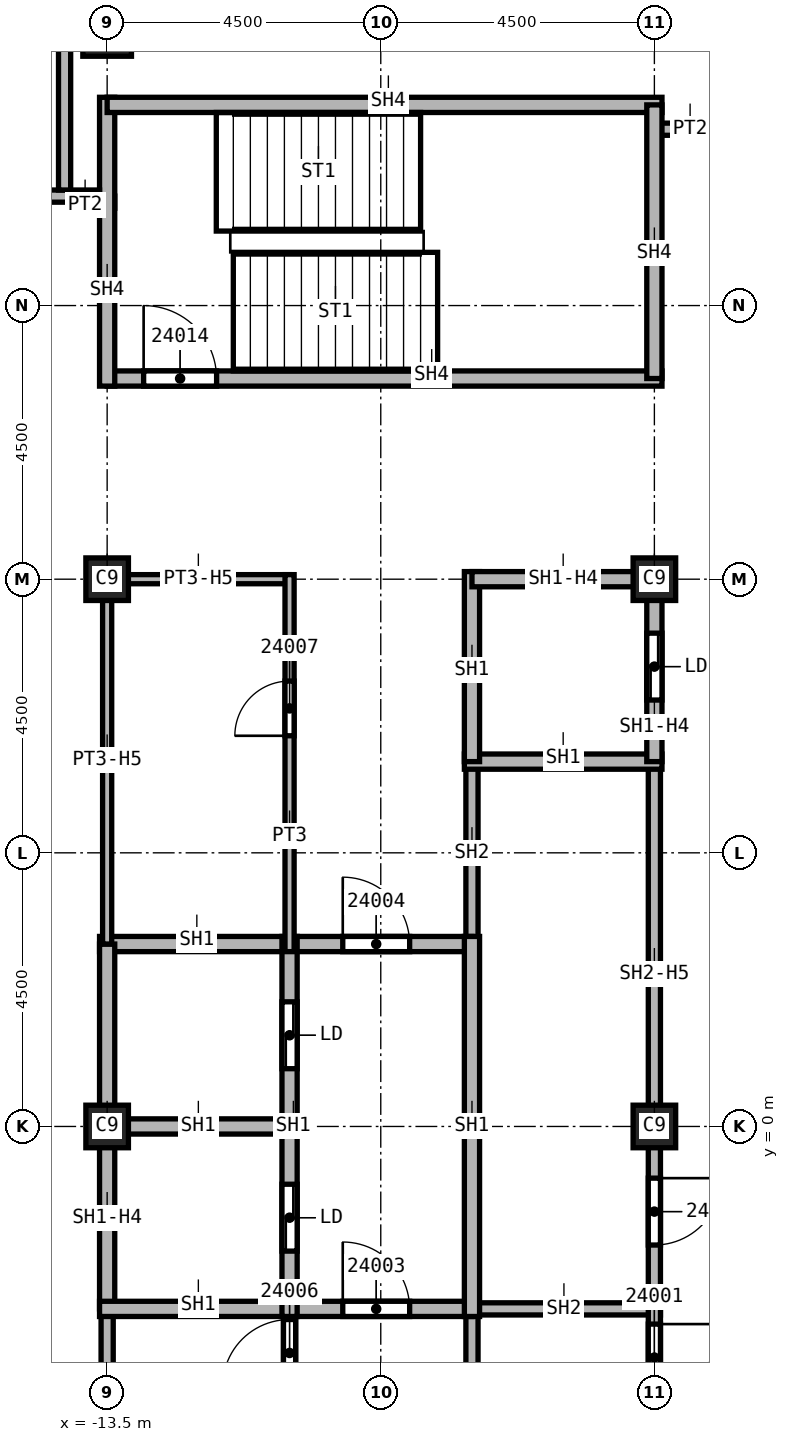
"""IFC4 building model, lengths in metres.
Left out: names, types, materials, properties, quantities, classifications, styles, units other than length and angle.
Written with IfcOpenShell. Run it as: python <this file> out.ifc"""

import sys

from ifc_helpers import new_model, si_unit, direction, frame, frame_2d, origin, origin_2d, place, context, subcontext, project, spatial, rectangle, extrude, element, fill, save


model = new_model("IFC4")
c1 = context("Model", 3, precision=1e-05, world=origin(), true_north=direction((0.0, 1.0)))
c2 = subcontext(c1, "Body", "Model", "MODEL_VIEW")
j1 = project(units=[si_unit("LENGTHUNIT", "METRE"), si_unit("PLANEANGLEUNIT", "RADIAN")], contexts=[c1])
p1 = place(None, origin())
s1 = spatial("IfcSite", under=j1, at=p1, CompositionType="ELEMENT")
p2 = place(p1, origin())
s2 = spatial("IfcBuilding", under=s1, at=p2, CompositionType="ELEMENT")
p3 = place(p2, frame((0.0, 0.0, 346.0)))
s3 = spatial("IfcBuildingStorey", under=s2, at=p3, CompositionType="ELEMENT", Elevation=346.0)
p4 = place(p3, frame((-13.5, 18.0, 0.0), z_axis=(0.0, 0.0, 1.0), x_axis=(1.0, 0.0, 0.0)))
e1 = element("IfcColumn", 1, at=p4, inside=s3, PredefinedType="COLUMN", context=c2, shape_type="SweptSolid", body=[
    extrude(rectangle(XDim=0.8, YDim=0.8, at=origin_2d()), origin(), (0.0, 0.0, 1.0), 3.59),
])
for number, where, z_axis, x_axis in (
    (2, (-4.5, 0.0, 0.0), (0.0, 0.0, 1.0), (1.0, 0.0, 0.0)),
    (3, (-4.5, 9.0, 0.0), (0.0, 0.0, 1.0), (1.0, 0.0, 0.0)),
    (4, (-13.5, 0.0, 0.0), (0.0, 0.0, 1.0), (1.0, 0.0, 0.0)),
    (5, (-13.5, 9.0, 0.0), (0.0, 0.0, 1.0), (1.0, 0.0, 0.0)),
):
    element("IfcColumn", number, at=place(p3, frame(where, z_axis=z_axis, x_axis=x_axis)), inside=s3, PredefinedType="COLUMN", context=c2, shape_type="SweptSolid", body=[
        extrude(rectangle(XDim=0.7, YDim=0.7, at=origin_2d()), origin(), (0.0, 0.0, 1.0), 3.59),
    ])
p5 = place(p3, frame((-14.1, 15.2, 0.0), z_axis=(0.0, 0.0, 1.0), x_axis=(1.0, 0.0, 0.0)))
e6 = element("IfcWall", 6, at=p5, inside=s3, PredefinedType="PARTITIONING", context=c2, shape_type="SweptSolid", body=[
    extrude(rectangle(XDim=0.725, YDim=0.2, at=frame_2d((0.363, 0.0))), origin(), (0.0, 0.0, 1.0), 3.59),
])
p6 = place(p3, frame((-4.5, 16.4, 0.0), z_axis=(0.0, 0.0, 1.0), x_axis=(1.0, 0.0, 0.0)))
e7 = element("IfcWall", 7, at=p6, inside=s3, PredefinedType="PARTITIONING", context=c2, shape_type="SweptSolid", body=[
    extrude(rectangle(XDim=1.05, YDim=0.2, at=frame_2d((0.525, 0.0))), origin(), (0.0, 0.0, 1.0), 3.59),
])
p7 = place(p3, frame((-13.5, -7.0, 0.0), z_axis=(0.0, 0.0, 1.0), x_axis=(0.0, 1.0, 0.0)))
e8 = element("IfcWall", 8, at=p7, inside=s3, PredefinedType="SOLIDWALL", context=c2, shape_type="SweptSolid", body=[
    extrude(rectangle(XDim=4.0, YDim=0.2, at=frame_2d((2.0, 0.0))), origin(), (0.0, 0.0, 1.0), 2.828),
])
p8 = place(p3, frame((-10.5, -7.075, 0.0), z_axis=(0.0, 0.0, 1.0), x_axis=(0.0, 1.0, 0.0)))
e9 = element("IfcWall", 9, at=p8, inside=s3, PredefinedType="SOLIDWALL", context=c2, shape_type="SweptSolid", body=[
    extrude(rectangle(XDim=4.2, YDim=0.2, at=frame_2d((2.1, 0.0))), origin(), (0.0, 0.0, 1.0), 3.59),
])
p9 = place(p8, frame((2.8, 0.0, 0.0)))
e10 = element("IfcOpeningElement", 10, at=p9, cuts=e9, PredefinedType="OPENING", context=c2, shape_type="SweptSolid", body=[
    extrude(rectangle(XDim=1.1, YDim=2.1, at=frame_2d((0.55, 1.05))), frame((0.0, 0.1, 0.0), z_axis=(0.0, -1.0, 0.0), x_axis=(1.0, 0.0, 0.0)), (0.0, 0.0, 1.0), 0.2),
])
p10 = place(p3, frame((-7.625, -3.0, 0.0), z_axis=(0.0, 0.0, 1.0), x_axis=(1.0, 0.0, 0.0)))
e11 = element("IfcWall", 11, at=p10, inside=s3, PredefinedType="SOLIDWALL", context=c2, shape_type="SweptSolid", body=[
    extrude(rectangle(XDim=3.225, YDim=0.2, at=frame_2d((1.613, 0.0))), origin(), (0.0, 0.0, 1.0), 3.59),
])
p11 = place(p3, frame((-7.5, -9.1, 0.0), z_axis=(0.0, 0.0, 1.0), x_axis=(0.0, 1.0, 0.0)))
e12 = element("IfcWall", 12, at=p11, inside=s3, PredefinedType="SOLIDWALL", context=c2, shape_type="SweptSolid", body=[
    extrude(rectangle(XDim=6.225, YDim=0.2, at=frame_2d((3.113, 0.0))), origin(), (0.0, 0.0, 1.0), 3.59),
])
p12 = place(p3, frame((-7.5, 2.875, 0.0), z_axis=(0.0, 0.0, 1.0), x_axis=(0.0, 1.0, 0.0)))
e13 = element("IfcWall", 13, at=p12, inside=s3, PredefinedType="SOLIDWALL", context=c2, shape_type="SweptSolid", body=[
    extrude(rectangle(XDim=3.125, YDim=0.2, at=frame_2d((1.562, 0.0))), origin(), (0.0, 0.0, 1.0), 3.59),
])
p13 = place(p3, frame((-4.5, 6.0, 0.0), z_axis=(0.0, 0.0, 1.0), x_axis=(0.0, -1.0, 0.0)))
e14 = element("IfcWall", 14, at=p13, inside=s3, PredefinedType="SOLIDWALL", context=c2, shape_type="SweptSolid", body=[
    extrude(rectangle(XDim=15.1, YDim=0.2, at=frame_2d((7.55, 0.0))), origin(), (0.0, 0.0, 1.0), 2.828),
])
p14 = place(p13, frame((9.25, 0.0, 0.0)))
e15 = element("IfcOpeningElement", 15, at=p14, cuts=e14, PredefinedType="OPENING", context=c2, shape_type="SweptSolid", body=[
    extrude(rectangle(XDim=1.1, YDim=2.1, at=frame_2d((0.55, 1.05))), frame((0.0, 0.1, 0.0), z_axis=(0.0, -1.0, 0.0), x_axis=(1.0, 0.0, 0.0)), (0.0, 0.0, 1.0), 0.2),
])
p15 = place(p13, frame((6.85, 0.0, 0.0)))
e16 = element("IfcOpeningElement", 16, at=p15, cuts=e14, PredefinedType="OPENING", context=c2, shape_type="SweptSolid", body=[
    extrude(rectangle(XDim=1.1, YDim=2.1, at=frame_2d((0.55, 1.05))), frame((0.0, 0.1, 0.0), z_axis=(0.0, -1.0, 0.0), x_axis=(1.0, 0.0, 0.0)), (0.0, 0.0, 1.0), 0.2),
])
p16 = place(p3, frame((-13.625, 0.0, 0.0), z_axis=(0.0, 0.0, 1.0), x_axis=(1.0, 0.0, 0.0)))
e17 = element("IfcWall", 17, at=p16, inside=s3, PredefinedType="SOLIDWALL", context=c2, shape_type="SweptSolid", body=[
    extrude(rectangle(XDim=3.125, YDim=0.25, at=frame_2d((1.562, 0.0))), origin(), (0.0, 0.0, 1.0), 3.59),
])
p17 = place(p3, frame((-13.625, 3.0, 0.0), z_axis=(0.0, 0.0, 1.0), x_axis=(1.0, 0.0, 0.0)))
e18 = element("IfcWall", 18, at=p17, inside=s3, PredefinedType="SOLIDWALL", context=c2, shape_type="SweptSolid", body=[
    extrude(rectangle(XDim=6.125, YDim=0.25, at=frame_2d((3.062, 0.0))), origin(), (0.0, 0.0, 1.0), 3.59),
])
p18 = place(p17, frame((4.0, 0.0, 0.0)))
e19 = element("IfcOpeningElement", 19, at=p18, cuts=e18, PredefinedType="OPENING", context=c2, shape_type="SweptSolid", body=[
    extrude(rectangle(XDim=1.1, YDim=2.1, at=frame_2d((0.55, 1.05))), frame((0.0, 0.125, 0.0), z_axis=(0.0, -1.0, 0.0), x_axis=(1.0, 0.0, 0.0)), (0.0, 0.0, 1.0), 0.25),
])
p19 = place(p3, frame((-13.5, -3.0, 0.0), z_axis=(0.0, 0.0, 1.0), x_axis=(0.0, 1.0, 0.0)))
e20 = element("IfcWall", 20, at=p19, inside=s3, PredefinedType="SOLIDWALL", context=c2, shape_type="SweptSolid", body=[
    extrude(rectangle(XDim=6.0, YDim=0.25, at=frame_2d((3.0, 0.0))), origin(), (0.0, 0.0, 1.0), 2.828),
])
p20 = place(p3, frame((-13.625, -3.0, 0.0), z_axis=(0.0, 0.0, 1.0), x_axis=(1.0, 0.0, 0.0)))
e21 = element("IfcWall", 21, at=p20, inside=s3, PredefinedType="SOLIDWALL", context=c2, shape_type="SweptSolid", body=[
    extrude(rectangle(XDim=6.125, YDim=0.25, at=frame_2d((3.062, 0.0))), origin(), (0.0, 0.0, 1.0), 3.59),
])
p21 = place(p20, frame((4.0, 0.0, 0.0)))
e22 = element("IfcOpeningElement", 22, at=p21, cuts=e21, PredefinedType="OPENING", context=c2, shape_type="SweptSolid", body=[
    extrude(rectangle(XDim=1.1, YDim=2.1, at=frame_2d((0.55, 1.05))), frame((0.0, 0.125, 0.0), z_axis=(0.0, -1.0, 0.0), x_axis=(1.0, 0.0, 0.0)), (0.0, 0.0, 1.0), 0.25),
])
p22 = place(p3, frame((-10.5, -3.125, 0.0), z_axis=(0.0, 0.0, 1.0), x_axis=(0.0, 1.0, 0.0)))
e23 = element("IfcWall", 23, at=p22, inside=s3, PredefinedType="SOLIDWALL", context=c2, shape_type="SweptSolid", body=[
    extrude(rectangle(XDim=6.25, YDim=0.25, at=frame_2d((3.125, 0.0))), origin(), (0.0, 0.0, 1.0), 3.59),
])
p23 = place(p22, frame((1.075, 0.0, 0.0)))
e24 = element("IfcOpeningElement", 24, at=p23, cuts=e23, PredefinedType="OPENING", context=c2, shape_type="SweptSolid", body=[
    extrude(rectangle(XDim=1.1, YDim=2.1, at=frame_2d((0.55, 1.05))), frame((0.0, 0.125, 0.0), z_axis=(0.0, -1.0, 0.0), x_axis=(1.0, 0.0, 0.0)), (0.0, 0.0, 1.0), 0.25),
])
p24 = place(p22, frame((4.075, 0.0, 0.0)))
e25 = element("IfcOpeningElement", 25, at=p24, cuts=e23, PredefinedType="OPENING", context=c2, shape_type="SweptSolid", body=[
    extrude(rectangle(XDim=1.1, YDim=2.1, at=frame_2d((0.55, 1.05))), frame((0.0, 0.125, 0.0), z_axis=(0.0, -1.0, 0.0), x_axis=(1.0, 0.0, 0.0)), (0.0, 0.0, 1.0), 0.25),
])
p25 = place(p3, frame((-7.625, 6.0, 0.0), z_axis=(0.0, 0.0, 1.0), x_axis=(1.0, 0.0, 0.0)))
e26 = element("IfcWall", 26, at=p25, inside=s3, PredefinedType="SOLIDWALL", context=c2, shape_type="SweptSolid", body=[
    extrude(rectangle(XDim=3.25, YDim=0.25, at=frame_2d((1.625, 0.0))), origin(), (0.0, 0.0, 1.0), 3.59),
])
p26 = place(p3, frame((-7.5, -3.125, 0.0), z_axis=(0.0, 0.0, 1.0), x_axis=(0.0, 1.0, 0.0)))
e27 = element("IfcWall", 27, at=p26, inside=s3, PredefinedType="SOLIDWALL", context=c2, shape_type="SweptSolid", body=[
    extrude(rectangle(XDim=6.25, YDim=0.25, at=frame_2d((3.125, 0.0))), origin(), (0.0, 0.0, 1.0), 3.59),
])
p27 = place(p3, frame((-7.5, 6.0, 0.0), z_axis=(0.0, 0.0, 1.0), x_axis=(0.0, 1.0, 0.0)))
e28 = element("IfcWall", 28, at=p27, inside=s3, PredefinedType="SOLIDWALL", context=c2, shape_type="SweptSolid", body=[
    extrude(rectangle(XDim=3.125, YDim=0.25, at=frame_2d((1.562, 0.0))), origin(), (0.0, 0.0, 1.0), 3.59),
])
p28 = place(p3, frame((-7.5, 9.0, 0.0), z_axis=(0.0, 0.0, 1.0), x_axis=(1.0, 0.0, 0.0)))
e29 = element("IfcWall", 29, at=p28, inside=s3, PredefinedType="SOLIDWALL", context=c2, shape_type="SweptSolid", body=[
    extrude(rectangle(XDim=3.0, YDim=0.25, at=frame_2d((1.5, 0.0))), origin(), (0.0, 0.0, 1.0), 2.828),
])
p29 = place(p3, frame((-4.5, 9.125, 0.0), z_axis=(0.0, 0.0, 1.0), x_axis=(0.0, -1.0, 0.0)))
e30 = element("IfcWall", 30, at=p29, inside=s3, PredefinedType="SOLIDWALL", context=c2, shape_type="SweptSolid", body=[
    extrude(rectangle(XDim=3.125, YDim=0.25, at=frame_2d((1.562, 0.0))), origin(), (0.0, 0.0, 1.0), 2.828),
])
p30 = place(p29, frame((1.012, 0.0, 0.0)))
e31 = element("IfcOpeningElement", 31, at=p30, cuts=e30, PredefinedType="OPENING", context=c2, shape_type="SweptSolid", body=[
    extrude(rectangle(XDim=1.1, YDim=2.1, at=frame_2d((0.55, 1.05))), frame((0.0, 0.125, 0.0), z_axis=(0.0, -1.0, 0.0), x_axis=(1.0, 0.0, 0.0)), (0.0, 0.0, 1.0), 0.25),
])
p31 = place(p3, frame((-13.5, 12.3, 0.0), z_axis=(0.0, 0.0, 1.0), x_axis=(1.0, 0.0, 0.0)))
e32 = element("IfcWall", 32, at=p31, inside=s3, PredefinedType="SOLIDWALL", context=c2, shape_type="SweptSolid", body=[
    extrude(rectangle(XDim=9.125, YDim=0.25, at=frame_2d((4.562, 0.0))), origin(), (0.0, 0.0, 1.0), 3.59),
])
p32 = place(p31, frame((0.6, 0.0, 0.0)))
e33 = element("IfcOpeningElement", 33, at=p32, cuts=e32, PredefinedType="OPENING", context=c2, shape_type="SweptSolid", body=[
    extrude(rectangle(XDim=1.2, YDim=2.1, at=frame_2d((0.6, 1.05))), frame((0.0, 0.125, 0.0), z_axis=(0.0, -1.0, 0.0), x_axis=(1.0, 0.0, 0.0)), (0.0, 0.0, 1.0), 0.25),
])
p33 = place(p3, frame((-13.5, 12.175, 0.0), z_axis=(0.0, 0.0, 1.0), x_axis=(0.0, 1.0, 0.0)))
e34 = element("IfcWall", 34, at=p33, inside=s3, PredefinedType="SOLIDWALL", context=c2, shape_type="SweptSolid", body=[
    extrude(rectangle(XDim=4.75, YDim=0.25, at=frame_2d((2.375, 0.0))), origin(), (0.0, 0.0, 1.0), 3.59),
])
p34 = place(p3, frame((-13.5, 16.8, 0.0), z_axis=(0.0, 0.0, 1.0), x_axis=(1.0, 0.0, 0.0)))
e35 = element("IfcWall", 35, at=p34, inside=s3, PredefinedType="SOLIDWALL", context=c2, shape_type="SweptSolid", body=[
    extrude(rectangle(XDim=9.125, YDim=0.25, at=frame_2d((4.562, 0.0))), origin(), (0.0, 0.0, 1.0), 3.59),
])
p35 = place(p3, frame((-4.5, 16.8, 0.0), z_axis=(0.0, 0.0, 1.0), x_axis=(0.0, -1.0, 0.0)))
e36 = element("IfcWall", 36, at=p35, inside=s3, PredefinedType="SOLIDWALL", context=c2, shape_type="SweptSolid", body=[
    extrude(rectangle(XDim=4.5, YDim=0.25, at=frame_2d((2.25, 0.0))), origin(), (0.0, 0.0, 1.0), 3.59),
])
p36 = place(p3, frame((-13.5, 3.0, 0.0), z_axis=(0.0, 0.0, 1.0), x_axis=(0.0, 1.0, 0.0)))
e37 = element("IfcWall", 37, at=p36, inside=s3, PredefinedType="PARTITIONING", context=c2, shape_type="SweptSolid", body=[
    extrude(rectangle(XDim=6.075, YDim=0.15, at=frame_2d((3.038, 0.0))), origin(), (0.0, 0.0, 1.0), 2.828),
])
p37 = place(p3, frame((-13.5, 9.0, 0.0), z_axis=(0.0, 0.0, 1.0), x_axis=(1.0, 0.0, 0.0)))
e38 = element("IfcWall", 38, at=p37, inside=s3, PredefinedType="PARTITIONING", context=c2, shape_type="SweptSolid", body=[
    extrude(rectangle(XDim=3.0, YDim=0.15, at=frame_2d((1.5, 0.0))), origin(), (0.0, 0.0, 1.0), 2.828),
])
p38 = place(p3, frame((-10.5, 2.875, 0.0), z_axis=(0.0, 0.0, 1.0), x_axis=(0.0, 1.0, 0.0)))
e39 = element("IfcWall", 39, at=p38, inside=s3, PredefinedType="PARTITIONING", context=c2, shape_type="SweptSolid", body=[
    extrude(rectangle(XDim=6.2, YDim=0.15, at=frame_2d((3.1, 0.0))), origin(), (0.0, 0.0, 1.0), 3.59),
])
p39 = place(p38, frame((3.55, 0.0, 0.0)))
e40 = element("IfcOpeningElement", 40, at=p39, cuts=e39, PredefinedType="OPENING", context=c2, shape_type="SweptSolid", body=[
    extrude(rectangle(XDim=0.9, YDim=2.1, at=frame_2d((0.45, 1.05))), frame((0.0, 0.075, 0.0), z_axis=(0.0, -1.0, 0.0), x_axis=(1.0, 0.0, 0.0)), (0.0, 0.0, 1.0), 0.15),
])
p40 = place(p3, frame((-21.9, 15.3, 0.0), z_axis=(0.0, 0.0, 1.0), x_axis=(1.0, 0.0, 0.0)))
e41 = element("IfcWall", 41, at=p40, inside=s3, PredefinedType="SOLIDWALL", context=c2, shape_type="SweptSolid", body=[
    extrude(rectangle(XDim=8.275, YDim=0.2, at=frame_2d((4.137, 0.0))), origin(), (0.0, 0.0, 1.0), 3.59),
])
p41 = place(p40, frame((4.8, 0.0, 0.0)))
e42 = element("IfcOpeningElement", 42, at=p41, cuts=e41, PredefinedType="OPENING", context=c2, shape_type="SweptSolid", body=[
    extrude(rectangle(XDim=1.2, YDim=2.1, at=frame_2d((0.6, 1.05))), frame((0.0, 0.1, 0.0), z_axis=(0.0, -1.0, 0.0), x_axis=(1.0, 0.0, 0.0)), (0.0, 0.0, 1.0), 0.2),
])
p42 = place(p3, frame((-14.2, 15.4, 0.0), z_axis=(0.0, 0.0, 1.0), x_axis=(0.0, 1.0, 0.0)))
e43 = element("IfcWall", 43, at=p42, inside=s3, PredefinedType="SOLIDWALL", context=c2, shape_type="SweptSolid", body=[
    extrude(rectangle(XDim=5.9, YDim=0.2, at=frame_2d((2.95, 0.0))), origin(), (0.0, 0.0, 1.0), 3.59),
])
p43 = place(p14, origin())
e44 = element("IfcDoor", 44, at=p43, inside=s3, OperationType="SINGLE_SWING_RIGHT", PredefinedType="DOOR", context=c2, shape_type="SweptSolid", body=[
    extrude(rectangle(XDim=1.1, YDim=2.1, at=frame_2d((0.55, 1.05))), frame((0.0, 0.025, 0.0), z_axis=(0.0, -1.0, 0.0), x_axis=(1.0, 0.0, 0.0)), (0.0, 0.0, 1.0), 0.05),
])
fill(e15, e44)
p44 = place(p15, origin())
e45 = element("IfcDoor", 45, at=p44, inside=s3, OperationType="SINGLE_SWING_LEFT", PredefinedType="DOOR", context=c2, shape_type="SweptSolid", body=[
    extrude(rectangle(XDim=1.1, YDim=2.1, at=frame_2d((0.55, 1.05))), frame((0.0, 0.025, 0.0), z_axis=(0.0, -1.0, 0.0), x_axis=(1.0, 0.0, 0.0)), (0.0, 0.0, 1.0), 0.05),
])
fill(e16, e45)
p45 = place(p21, origin())
e46 = element("IfcDoor", 46, at=p45, inside=s3, OperationType="SINGLE_SWING_RIGHT", PredefinedType="DOOR", context=c2, shape_type="SweptSolid", body=[
    extrude(rectangle(XDim=1.1, YDim=2.1, at=frame_2d((0.55, 1.05))), frame((0.0, 0.025, 0.0), z_axis=(0.0, -1.0, 0.0), x_axis=(1.0, 0.0, 0.0)), (0.0, 0.0, 1.0), 0.05),
])
fill(e22, e46)
p46 = place(p18, origin())
e47 = element("IfcDoor", 47, at=p46, inside=s3, OperationType="SINGLE_SWING_LEFT", PredefinedType="DOOR", context=c2, shape_type="SweptSolid", body=[
    extrude(rectangle(XDim=1.1, YDim=2.1, at=frame_2d((0.55, 1.05))), frame((0.0, 0.025, 0.0), z_axis=(0.0, -1.0, 0.0), x_axis=(1.0, 0.0, 0.0)), (0.0, 0.0, 1.0), 0.05),
])
fill(e19, e47)
p47 = place(p9, origin())
e48 = element("IfcDoor", 48, at=p47, inside=s3, OperationType="SINGLE_SWING_LEFT", PredefinedType="DOOR", context=c2, shape_type="SweptSolid", body=[
    extrude(rectangle(XDim=1.1, YDim=2.1, at=frame_2d((0.55, 1.05))), frame((0.0, 0.025, 0.0), z_axis=(0.0, -1.0, 0.0), x_axis=(1.0, 0.0, 0.0)), (0.0, 0.0, 1.0), 0.05),
])
fill(e10, e48)
p48 = place(p39, origin())
e49 = element("IfcDoor", 49, at=p48, inside=s3, OperationType="SINGLE_SWING_RIGHT", PredefinedType="DOOR", context=c2, shape_type="SweptSolid", body=[
    extrude(rectangle(XDim=0.9, YDim=2.1, at=frame_2d((0.45, 1.05))), frame((0.0, 0.025, 0.0), z_axis=(0.0, -1.0, 0.0), x_axis=(1.0, 0.0, 0.0)), (0.0, 0.0, 1.0), 0.05),
])
fill(e40, e49)
p49 = place(p32, origin())
e50 = element("IfcDoor", 50, at=p49, inside=s3, OperationType="SINGLE_SWING_LEFT", PredefinedType="DOOR", context=c2, shape_type="SweptSolid", body=[
    extrude(rectangle(XDim=1.2, YDim=2.1, at=frame_2d((0.6, 1.05))), frame((0.0, 0.025, 0.0), z_axis=(0.0, -1.0, 0.0), x_axis=(1.0, 0.0, 0.0)), (0.0, 0.0, 1.0), 0.05),
])
fill(e33, e50)
p50 = place(p30, origin())
e51 = element("IfcDoor", 51, at=p50, inside=s3, OperationType="SLIDING_TO_LEFT", PredefinedType="DOOR", context=c2, shape_type="SweptSolid", body=[
    extrude(rectangle(XDim=1.1, YDim=2.1, at=frame_2d((0.55, 1.05))), frame((0.0, 0.025, 0.0), z_axis=(0.0, -1.0, 0.0), x_axis=(1.0, 0.0, 0.0)), (0.0, 0.0, 1.0), 0.05),
])
fill(e31, e51)
p51 = place(p23, origin())
e52 = element("IfcDoor", 52, at=p51, inside=s3, OperationType="SLIDING_TO_LEFT", PredefinedType="DOOR", context=c2, shape_type="SweptSolid", body=[
    extrude(rectangle(XDim=1.1, YDim=2.1, at=frame_2d((0.55, 1.05))), frame((0.0, 0.025, 0.0), z_axis=(0.0, -1.0, 0.0), x_axis=(1.0, 0.0, 0.0)), (0.0, 0.0, 1.0), 0.05),
])
fill(e24, e52)
p52 = place(p24, origin())
e53 = element("IfcDoor", 53, at=p52, inside=s3, OperationType="SLIDING_TO_LEFT", PredefinedType="DOOR", context=c2, shape_type="SweptSolid", body=[
    extrude(rectangle(XDim=1.1, YDim=2.1, at=frame_2d((0.55, 1.05))), frame((0.0, 0.025, 0.0), z_axis=(0.0, -1.0, 0.0), x_axis=(1.0, 0.0, 0.0)), (0.0, 0.0, 1.0), 0.05),
])
fill(e25, e53)
save(model, sys.argv[1])
